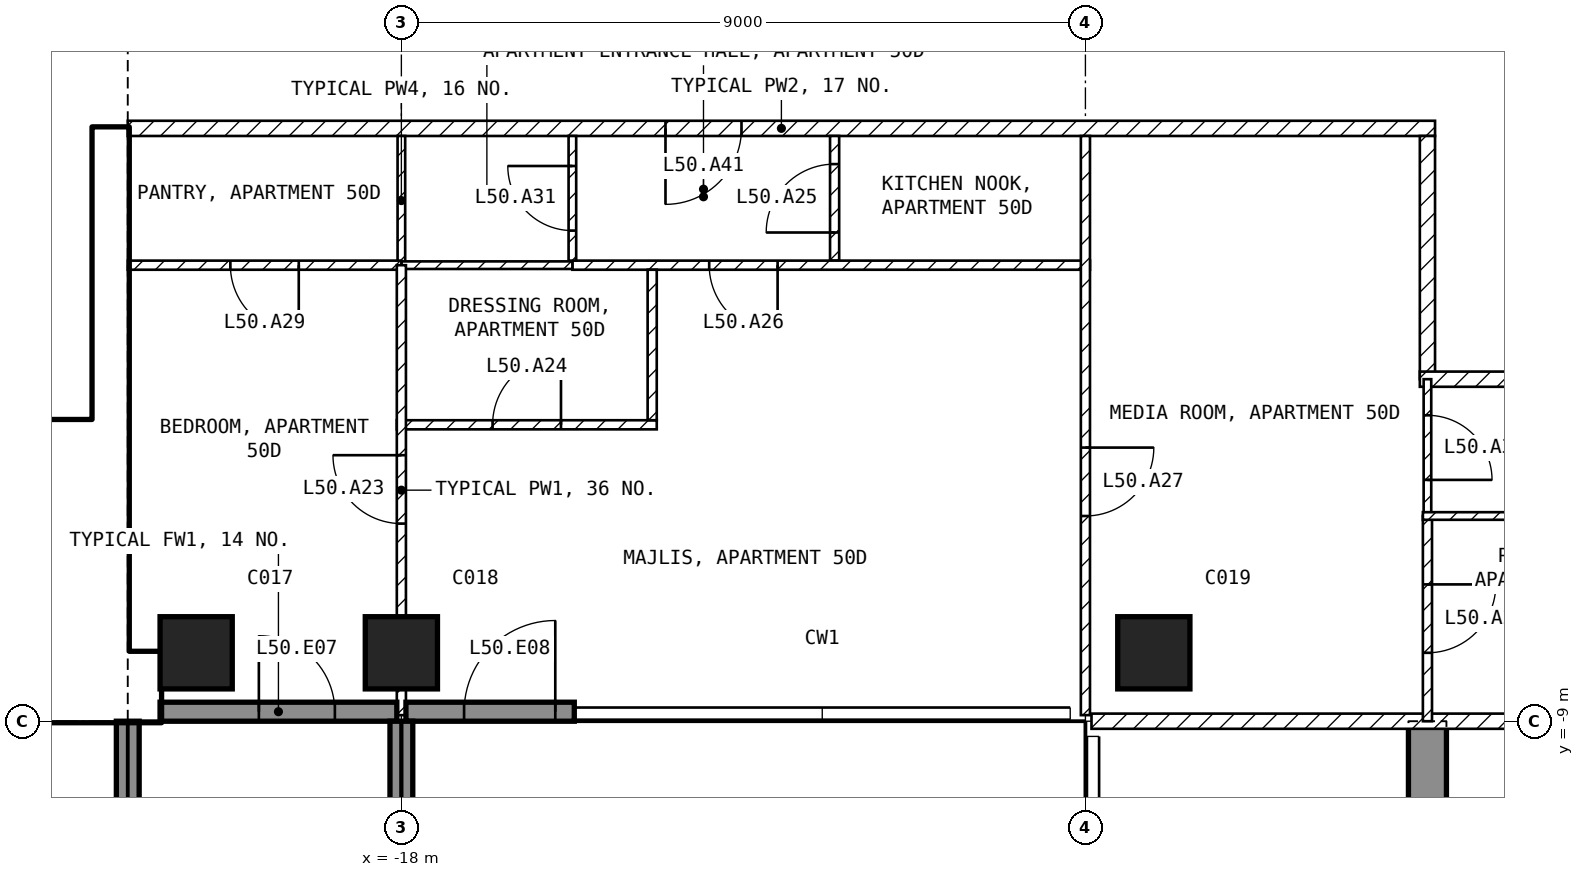
"""IFC4 building model, lengths in metres.
Left out: names, types, materials, properties, quantities, classifications, styles, units other than length and angle.
Written with IfcOpenShell. Run it as: python <this file> out.ifc"""

import sys

from ifc_helpers import new_model, si_unit, direction, frame, frame_2d, origin, origin_2d, place, context, subcontext, project, spatial, polyline, rectangle, outline, extrude, element, fill, save


model = new_model("IFC4")
c1 = context("Model", 3, precision=1e-05, world=origin(), true_north=direction((0.0, 1.0)))
c2 = subcontext(c1, "Body", "Model", "MODEL_VIEW")
j1 = project(units=[si_unit("LENGTHUNIT", "METRE"), si_unit("PLANEANGLEUNIT", "RADIAN")], contexts=[c1])
p1 = place(None, origin())
s1 = spatial("IfcSite", under=j1, at=p1, CompositionType="ELEMENT")
p2 = place(p1, origin())
s2 = spatial("IfcBuilding", under=s1, at=p2, CompositionType="ELEMENT")
p3 = place(p2, frame((0.0, 0.0, 201.6)))
s3 = spatial("IfcBuildingStorey", under=s2, at=p3, CompositionType="ELEMENT", Elevation=201.6)
for number, where, z_axis, x_axis in (
    (1, (-20.7, -8.1, -0.25), (0.0, 0.0, 1.0), (1.0, 0.0, 0.0)),
    (2, (-18.0, -8.1, -0.25), (0.0, 0.0, 1.0), (1.0, 0.0, 0.0)),
    (3, (-8.1, -8.1, -0.25), (0.0, 0.0, 1.0), (1.0, 0.0, 0.0)),
):
    element("IfcColumn", number, at=place(p3, frame(where, z_axis=z_axis, x_axis=x_axis)), inside=s3, PredefinedType="COLUMN", context=c2, shape_type="SweptSolid", body=[
        extrude(rectangle(XDim=0.95, YDim=0.95, at=origin_2d()), origin(), (0.0, 0.0, 1.0), 3.5),
    ])
p4 = place(p3, frame((-4.75, -20.225, -0.25), z_axis=(1.0, 0.0, 0.0), x_axis=(0.0, 1.0, 0.0)))
e4 = element("IfcWall", 4, at=p4, inside=s3, PredefinedType="SHEAR", context=c2, shape_type="SweptSolid", body=[
    extrude(outline(polyline([(0.0, 0.0), (6.725, 0.0), (6.725, 2.65), (9.125, 2.65), (9.125, 0.0), (11.225, 0.0), (11.225, 3.5), (0.0, 3.5), (0.0, 0.0)])), origin(), (0.0, 0.0, 1.0), 0.5),
])
p5 = place(p3, frame((-21.175, -8.875, 0.0), z_axis=(0.0, 0.0, 1.0), x_axis=(1.0, 0.0, 0.0)))
e5 = element("IfcWall", 5, at=p5, inside=s3, PredefinedType="SOLIDWALL", context=c2, shape_type="SweptSolid", body=[
    extrude(rectangle(XDim=3.115, YDim=0.25, at=frame_2d((1.558, 0.0))), origin(), (0.0, 0.0, 1.0), 3.25),
])
p6 = place(p5, frame((1.3, 0.0, 0.0)))
e6 = element("IfcOpeningElement", 6, at=p6, cuts=e5, PredefinedType="OPENING", context=c2, shape_type="SweptSolid", body=[
    extrude(rectangle(XDim=1.0, YDim=2.4, at=frame_2d((0.5, 1.2))), frame((0.0, 0.135, 0.0), z_axis=(0.0, -1.0, 0.0), x_axis=(1.0, 0.0, 0.0)), (0.0, 0.0, 1.0), 0.27),
])
p7 = place(p3, frame((-17.94, -8.875, 0.0), z_axis=(0.0, 0.0, 1.0), x_axis=(1.0, 0.0, 0.0)))
e7 = element("IfcWall", 7, at=p7, inside=s3, PredefinedType="SOLIDWALL", context=c2, shape_type="SweptSolid", body=[
    extrude(rectangle(XDim=2.215, YDim=0.25, at=frame_2d((1.107, 0.0))), origin(), (0.0, 0.0, 1.0), 3.25),
])
p8 = place(p7, frame((0.765, 0.0, 0.0)))
e8 = element("IfcOpeningElement", 8, at=p8, cuts=e7, PredefinedType="OPENING", context=c2, shape_type="SweptSolid", body=[
    extrude(rectangle(XDim=1.2, YDim=2.4, at=frame_2d((0.6, 1.2))), frame((0.0, 0.135, 0.0), z_axis=(0.0, -1.0, 0.0), x_axis=(1.0, 0.0, 0.0)), (0.0, 0.0, 1.0), 0.27),
])
for number, where, z_axis, x_axis in (
    (9, (-21.6, -9.0, 0.0), (0.0, 0.0, 1.0), (0.0, -1.0, 0.0)),
    (10, (-18.0, -9.0, 0.0), (0.0, 0.0, 1.0), (0.0, -1.0, 0.0)),
):
    element("IfcWall", number, at=place(p3, frame(where, z_axis=z_axis, x_axis=x_axis)), inside=s3, PredefinedType="SOLIDWALL", context=c2, shape_type="SweptSolid", body=[
        extrude(rectangle(XDim=2.7, YDim=0.3, at=frame_2d((1.35, 0.0))), origin(), (0.0, 0.0, 1.0), 3.25),
    ])
p9 = place(p3, frame((-30.2, -8.55, 0.0), z_axis=(0.0, 0.0, 1.0), x_axis=(1.0, 0.0, 0.0)))
e11 = element("IfcWall", 11, at=p9, inside=s3, PredefinedType="SHEAR", context=c2, shape_type="SweptSolid", body=[
    extrude(rectangle(XDim=9.025, YDim=0.9, at=frame_2d((4.512, 0.0))), origin(), (0.0, 0.0, 1.0), 3.25),
])
p10 = place(p3, frame((-21.825, -8.1, 0.0), z_axis=(0.0, 0.0, 1.0), x_axis=(0.0, 1.0, 0.0)))
e12 = element("IfcWall", 12, at=p10, inside=s3, PredefinedType="SHEAR", context=c2, shape_type="SweptSolid", body=[
    extrude(rectangle(XDim=6.9, YDim=0.45, at=frame_2d((3.45, 0.0))), origin(), (0.0, 0.0, 1.0), 3.25),
])
p11 = place(p3, frame((-28.35, -5.15, 0.0), z_axis=(0.0, 0.0, 1.0), x_axis=(1.0, 0.0, 0.0)))
e13 = element("IfcWall", 13, at=p11, inside=s3, PredefinedType="SOLIDWALL", context=c2, shape_type="SweptSolid", body=[
    extrude(rectangle(XDim=6.3, YDim=0.2, at=frame_2d((3.15, 0.0))), origin(), (0.0, 0.0, 1.0), 3.25),
])
p12 = place(p11, frame((5.1, 0.0, 0.0)))
e14 = element("IfcOpeningElement", 14, at=p12, cuts=e13, PredefinedType="OPENING", context=c2, shape_type="SweptSolid", body=[
    extrude(rectangle(XDim=1.0, YDim=2.1, at=frame_2d((0.5, 1.05))), frame((0.0, 0.11, 0.0), z_axis=(0.0, -1.0, 0.0), x_axis=(1.0, 0.0, 0.0)), (0.0, 0.0, 1.0), 0.22),
])
p13 = place(p3, frame((-4.4, -1.2, 0.0), z_axis=(0.0, 0.0, 1.0), x_axis=(-1.0, 0.0, 0.0)))
e15 = element("IfcWall", 15, at=p13, inside=s3, PredefinedType="PARTITIONING", context=c2, shape_type="SweptSolid", body=[
    extrude(rectangle(XDim=17.2, YDim=0.2, at=frame_2d((8.6, 0.0))), origin(), (0.0, 0.0, 1.0), 3.25),
])
p14 = place(p13, frame((9.125, 0.0, 0.0)))
e16 = element("IfcOpeningElement", 16, at=p14, cuts=e15, PredefinedType="OPENING", context=c2, shape_type="SweptSolid", body=[
    extrude(rectangle(XDim=1.0, YDim=2.1, at=frame_2d((0.5, 1.05))), frame((0.0, 0.11, 0.0), z_axis=(0.0, -1.0, 0.0), x_axis=(1.0, 0.0, 0.0)), (0.0, 0.0, 1.0), 0.22),
])
p15 = place(p3, frame((-4.5, -4.5, 0.0), z_axis=(0.0, 0.0, 1.0), x_axis=(0.0, 1.0, 0.0)))
e17 = element("IfcWall", 17, at=p15, inside=s3, PredefinedType="PARTITIONING", context=c2, shape_type="SweptSolid", body=[
    extrude(rectangle(XDim=3.2, YDim=0.2, at=frame_2d((1.6, 0.0))), origin(), (0.0, 0.0, 1.0), 3.25),
])
p16 = place(p3, frame((-1.1, -4.5, 0.0), z_axis=(0.0, 0.0, 1.0), x_axis=(-1.0, 0.0, 0.0)))
e18 = element("IfcWall", 18, at=p16, inside=s3, PredefinedType="PARTITIONING", context=c2, shape_type="SweptSolid", body=[
    extrude(rectangle(XDim=3.5, YDim=0.2, at=frame_2d((1.75, 0.0))), origin(), (0.0, 0.0, 1.0), 3.25),
])
p17 = place(p3, frame((8.92, -9.0, 0.0), z_axis=(0.0, 0.0, 1.0), x_axis=(-1.0, 0.0, 0.0)))
e19 = element("IfcWall", 19, at=p17, inside=s3, PredefinedType="PARTITIONING", context=c2, shape_type="SweptSolid", body=[
    extrude(rectangle(XDim=17.84, YDim=0.2, at=frame_2d((8.92, 0.0))), origin(), (0.0, 0.0, 1.0), 3.25),
])
p18 = place(p17, frame((8.42, 0.0, 0.0)))
e20 = element("IfcOpeningElement", 20, at=p18, cuts=e19, PredefinedType="OPENING", context=c2, shape_type="SweptSolid", body=[
    extrude(rectangle(XDim=1.0, YDim=2.1, at=frame_2d((0.5, 1.05))), frame((0.0, 0.11, 0.0), z_axis=(0.0, -1.0, 0.0), x_axis=(1.0, 0.0, 0.0)), (0.0, 0.0, 1.0), 0.22),
])
p19 = place(p3, frame((-12.3, -2.94, 0.0), z_axis=(0.0, 0.0, 1.0), x_axis=(0.0, 1.0, 0.0)))
e21 = element("IfcWall", 21, at=p19, inside=s3, PredefinedType="PARTITIONING", context=c2, shape_type="SweptSolid", body=[
    extrude(rectangle(XDim=1.64, YDim=0.12, at=frame_2d((0.82, 0.0))), origin(), (0.0, 0.0, 1.0), 3.25),
])
p20 = place(p19, frame((0.37, 0.0, 0.0)))
e22 = element("IfcOpeningElement", 22, at=p20, cuts=e21, PredefinedType="OPENING", context=c2, shape_type="SweptSolid", body=[
    extrude(rectangle(XDim=0.9, YDim=2.1, at=frame_2d((0.45, 1.05))), frame((0.0, 0.07, 0.0), z_axis=(0.0, -1.0, 0.0), x_axis=(1.0, 0.0, 0.0)), (0.0, 0.0, 1.0), 0.14),
])
p21 = place(p3, frame((-8.94, -3.0, 0.0), z_axis=(0.0, 0.0, 1.0), x_axis=(-1.0, 0.0, 0.0)))
e23 = element("IfcWall", 23, at=p21, inside=s3, PredefinedType="PARTITIONING", context=c2, shape_type="SweptSolid", body=[
    extrude(rectangle(XDim=6.81, YDim=0.12, at=frame_2d((3.405, 0.0))), origin(), (0.0, 0.0, 1.0), 3.25),
])
p22 = place(p21, frame((4.11, 0.0, 0.0)))
e24 = element("IfcOpeningElement", 24, at=p22, cuts=e23, PredefinedType="OPENING", context=c2, shape_type="SweptSolid", body=[
    extrude(rectangle(XDim=0.9, YDim=2.1, at=frame_2d((0.45, 1.05))), frame((0.0, 0.07, 0.0), z_axis=(0.0, -1.0, 0.0), x_axis=(1.0, 0.0, 0.0)), (0.0, 0.0, 1.0), 0.14),
])
p23 = place(p3, frame((-9.0, -1.3, 0.0), z_axis=(0.0, 0.0, 1.0), x_axis=(0.0, -1.0, 0.0)))
e25 = element("IfcWall", 25, at=p23, inside=s3, PredefinedType="PARTITIONING", context=c2, shape_type="SweptSolid", body=[
    extrude(rectangle(XDim=7.62, YDim=0.12, at=frame_2d((3.81, 0.0))), origin(), (0.0, 0.0, 1.0), 3.25),
])
p24 = place(p23, frame((4.1, 0.0, 0.0)))
e26 = element("IfcOpeningElement", 26, at=p24, cuts=e25, PredefinedType="OPENING", context=c2, shape_type="SweptSolid", body=[
    extrude(rectangle(XDim=0.9, YDim=2.1, at=frame_2d((0.45, 1.05))), frame((0.0, 0.07, 0.0), z_axis=(0.0, -1.0, 0.0), x_axis=(1.0, 0.0, 0.0)), (0.0, 0.0, 1.0), 0.14),
])
p25 = place(p3, frame((-15.75, -2.94, 0.0), z_axis=(0.0, 0.0, 1.0), x_axis=(0.0, 1.0, 0.0)))
e27 = element("IfcWall", 27, at=p25, inside=s3, PredefinedType="PARTITIONING", context=c2, shape_type="SweptSolid", body=[
    extrude(rectangle(XDim=1.64, YDim=0.1, at=frame_2d((0.82, 0.0))), origin(), (0.0, 0.0, 1.0), 3.25),
])
p26 = place(p25, frame((0.395, 0.0, 0.0)))
e28 = element("IfcOpeningElement", 28, at=p26, cuts=e27, PredefinedType="OPENING", context=c2, shape_type="SweptSolid", body=[
    extrude(rectangle(XDim=0.85, YDim=2.1, at=frame_2d((0.425, 1.05))), frame((0.0, 0.06, 0.0), z_axis=(0.0, -1.0, 0.0), x_axis=(1.0, 0.0, 0.0)), (0.0, 0.0, 1.0), 0.12),
])
p27 = place(p3, frame((-18.0, -3.0, 0.0), z_axis=(0.0, 0.0, 1.0), x_axis=(0.0, 1.0, 0.0)))
e29 = element("IfcWall", 29, at=p27, inside=s3, PredefinedType="PARTITIONING", context=c2, shape_type="SweptSolid", body=[
    extrude(rectangle(XDim=1.7, YDim=0.1, at=frame_2d((0.85, 0.0))), origin(), (0.0, 0.0, 1.0), 2.48),
])
p28 = place(p3, frame((-15.75, -3.0, 0.0), z_axis=(0.0, 0.0, 1.0), x_axis=(-1.0, 0.0, 0.0)))
e30 = element("IfcWall", 30, at=p28, inside=s3, PredefinedType="PARTITIONING", context=c2, shape_type="SweptSolid", body=[
    extrude(rectangle(XDim=2.25, YDim=0.1, at=frame_2d((1.125, 0.0))), origin(), (0.0, 0.0, 1.0), 3.25),
])
p29 = place(p3, frame((-18.0, -3.0, 0.0), z_axis=(0.0, 0.0, 1.0), x_axis=(-1.0, 0.0, 0.0)))
e31 = element("IfcWall", 31, at=p29, inside=s3, PredefinedType="PARTITIONING", context=c2, shape_type="SweptSolid", body=[
    extrude(rectangle(XDim=3.6, YDim=0.12, at=frame_2d((1.8, 0.0))), origin(), (0.0, 0.0, 1.0), 3.25),
])
p30 = place(p29, frame((1.35, 0.0, 0.0)))
e32 = element("IfcOpeningElement", 32, at=p30, cuts=e31, PredefinedType="OPENING", context=c2, shape_type="SweptSolid", body=[
    extrude(rectangle(XDim=0.9, YDim=2.1, at=frame_2d((0.45, 1.05))), frame((0.0, 0.07, 0.0), z_axis=(0.0, -1.0, 0.0), x_axis=(1.0, 0.0, 0.0)), (0.0, 0.0, 1.0), 0.14),
])
p31 = place(p3, frame((-18.06, -5.1, 0.0), z_axis=(0.0, 0.0, 1.0), x_axis=(1.0, 0.0, 0.0)))
e33 = element("IfcWall", 33, at=p31, inside=s3, PredefinedType="PARTITIONING", context=c2, shape_type="SweptSolid", body=[
    extrude(rectangle(XDim=3.42, YDim=0.12, at=frame_2d((1.71, 0.0))), origin(), (0.0, 0.0, 1.0), 3.25),
])
p32 = place(p31, frame((1.26, 0.0, 0.0)))
e34 = element("IfcOpeningElement", 34, at=p32, cuts=e33, PredefinedType="OPENING", context=c2, shape_type="SweptSolid", body=[
    extrude(rectangle(XDim=0.9, YDim=2.1, at=frame_2d((0.45, 1.05))), frame((0.0, 0.07, 0.0), z_axis=(0.0, -1.0, 0.0), x_axis=(1.0, 0.0, 0.0)), (0.0, 0.0, 1.0), 0.14),
])
p33 = place(p3, frame((-14.7, -5.04, 0.0), z_axis=(0.0, 0.0, 1.0), x_axis=(0.0, 1.0, 0.0)))
e35 = element("IfcWall", 35, at=p33, inside=s3, PredefinedType="PARTITIONING", context=c2, shape_type="SweptSolid", body=[
    extrude(rectangle(XDim=1.98, YDim=0.12, at=frame_2d((0.99, 0.0))), origin(), (0.0, 0.0, 1.0), 3.25),
])
p34 = place(p3, frame((-18.0, -8.92, 0.0), z_axis=(0.0, 0.0, 1.0), x_axis=(0.0, 1.0, 0.0)))
e36 = element("IfcWall", 36, at=p34, inside=s3, PredefinedType="PARTITIONING", context=c2, shape_type="SweptSolid", body=[
    extrude(rectangle(XDim=5.92, YDim=0.12, at=frame_2d((2.96, 0.0))), origin(), (0.0, 0.0, 1.0), 2.48),
])
p35 = place(p34, frame((2.52, 0.0, 0.0)))
e37 = element("IfcOpeningElement", 37, at=p35, cuts=e36, PredefinedType="OPENING", context=c2, shape_type="SweptSolid", body=[
    extrude(rectangle(XDim=0.9, YDim=2.1, at=frame_2d((0.45, 1.05))), frame((0.0, 0.07, 0.0), z_axis=(0.0, -1.0, 0.0), x_axis=(1.0, 0.0, 0.0)), (0.0, 0.0, 1.0), 0.14),
])
p36 = place(p3, frame((-4.5, -4.5, 0.0), z_axis=(0.0, 0.0, 1.0), x_axis=(0.0, -1.0, 0.0)))
e38 = element("IfcWall", 38, at=p36, inside=s3, PredefinedType="PARTITIONING", context=c2, shape_type="SweptSolid", body=[
    extrude(rectangle(XDim=1.8, YDim=0.1, at=frame_2d((0.9, 0.0))), origin(), (0.0, 0.0, 1.0), 3.25),
])
p37 = place(p36, frame((0.475, 0.0, 0.0)))
e39 = element("IfcOpeningElement", 39, at=p37, cuts=e38, PredefinedType="OPENING", context=c2, shape_type="SweptSolid", body=[
    extrude(rectangle(XDim=0.85, YDim=2.1, at=frame_2d((0.425, 1.05))), frame((0.0, 0.06, 0.0), z_axis=(0.0, -1.0, 0.0), x_axis=(1.0, 0.0, 0.0)), (0.0, 0.0, 1.0), 0.12),
])
p38 = place(p3, frame((-4.5, -6.3, 0.0), z_axis=(0.0, 0.0, 1.0), x_axis=(0.0, -1.0, 0.0)))
e40 = element("IfcWall", 40, at=p38, inside=s3, PredefinedType="PARTITIONING", context=c2, shape_type="SweptSolid", body=[
    extrude(rectangle(XDim=2.7, YDim=0.12, at=frame_2d((1.35, 0.0))), origin(), (0.0, 0.0, 1.0), 3.25),
])
p39 = place(p38, frame((0.9, 0.0, 0.0)))
e41 = element("IfcOpeningElement", 41, at=p39, cuts=e40, PredefinedType="OPENING", context=c2, shape_type="SweptSolid", body=[
    extrude(rectangle(XDim=0.9, YDim=2.1, at=frame_2d((0.45, 1.05))), frame((0.0, 0.07, 0.0), z_axis=(0.0, -1.0, 0.0), x_axis=(1.0, 0.0, 0.0)), (0.0, 0.0, 1.0), 0.14),
])
p40 = place(p3, frame((-1.1, -6.3, 0.0), z_axis=(0.0, 0.0, 1.0), x_axis=(-1.0, 0.0, 0.0)))
e42 = element("IfcWall", 42, at=p40, inside=s3, PredefinedType="PARTITIONING", context=c2, shape_type="SweptSolid", body=[
    extrude(rectangle(XDim=3.46, YDim=0.1, at=frame_2d((1.73, 0.0))), origin(), (0.0, 0.0, 1.0), 3.25),
])
p41 = place(p6, origin())
e43 = element("IfcDoor", 43, at=p41, inside=s3, OperationType="SINGLE_SWING_LEFT", PredefinedType="DOOR", context=c2, shape_type="SweptSolid", body=[
    extrude(rectangle(XDim=1.0, YDim=2.4, at=frame_2d((0.5, 1.2))), frame((0.0, 0.025, 0.0), z_axis=(0.0, -1.0, 0.0), x_axis=(1.0, 0.0, 0.0)), (0.0, 0.0, 1.0), 0.05),
])
fill(e6, e43)
p42 = place(p8, origin())
e44 = element("IfcDoor", 44, at=p42, inside=s3, OperationType="SINGLE_SWING_RIGHT", PredefinedType="DOOR", context=c2, shape_type="SweptSolid", body=[
    extrude(rectangle(XDim=1.2, YDim=2.4, at=frame_2d((0.6, 1.2))), frame((0.0, 0.025, 0.0), z_axis=(0.0, -1.0, 0.0), x_axis=(1.0, 0.0, 0.0)), (0.0, 0.0, 1.0), 0.05),
])
fill(e8, e44)
p43 = place(p12, origin())
e45 = element("IfcDoor", 45, at=p43, inside=s3, OperationType="SINGLE_SWING_LEFT", PredefinedType="DOOR", context=c2, shape_type="SweptSolid", body=[
    extrude(rectangle(XDim=1.0, YDim=2.1, at=frame_2d((0.5, 1.05))), frame((0.0, 0.025, 0.0), z_axis=(0.0, -1.0, 0.0), x_axis=(1.0, 0.0, 0.0)), (0.0, 0.0, 1.0), 0.05),
])
fill(e14, e45)
p44 = place(p35, origin())
e46 = element("IfcDoor", 46, at=p44, inside=s3, OperationType="SINGLE_SWING_RIGHT", PredefinedType="DOOR", context=c2, shape_type="SweptSolid", body=[
    extrude(rectangle(XDim=0.9, YDim=2.1, at=frame_2d((0.45, 1.05))), frame((0.0, 0.025, 0.0), z_axis=(0.0, -1.0, 0.0), x_axis=(1.0, 0.0, 0.0)), (0.0, 0.0, 1.0), 0.05),
])
fill(e37, e46)
p45 = place(p32, origin())
e47 = element("IfcDoor", 47, at=p45, inside=s3, OperationType="SINGLE_SWING_RIGHT", PredefinedType="DOOR", context=c2, shape_type="SweptSolid", body=[
    extrude(rectangle(XDim=0.9, YDim=2.1, at=frame_2d((0.45, 1.05))), frame((0.0, 0.025, 0.0), z_axis=(0.0, -1.0, 0.0), x_axis=(1.0, 0.0, 0.0)), (0.0, 0.0, 1.0), 0.05),
])
fill(e34, e47)
p46 = place(p20, origin())
e48 = element("IfcDoor", 48, at=p46, inside=s3, OperationType="SINGLE_SWING_LEFT", PredefinedType="DOOR", context=c2, shape_type="SweptSolid", body=[
    extrude(rectangle(XDim=0.9, YDim=2.1, at=frame_2d((0.45, 1.05))), frame((0.0, 0.025, 0.0), z_axis=(0.0, -1.0, 0.0), x_axis=(1.0, 0.0, 0.0)), (0.0, 0.0, 1.0), 0.05),
])
fill(e22, e48)
p47 = place(p22, origin())
e49 = element("IfcDoor", 49, at=p47, inside=s3, OperationType="SINGLE_SWING_LEFT", PredefinedType="DOOR", context=c2, shape_type="SweptSolid", body=[
    extrude(rectangle(XDim=0.9, YDim=2.1, at=frame_2d((0.45, 1.05))), frame((0.0, 0.025, 0.0), z_axis=(0.0, -1.0, 0.0), x_axis=(1.0, 0.0, 0.0)), (0.0, 0.0, 1.0), 0.05),
])
fill(e24, e49)
p48 = place(p24, origin())
e50 = element("IfcDoor", 50, at=p48, inside=s3, OperationType="SINGLE_SWING_LEFT", PredefinedType="DOOR", context=c2, shape_type="SweptSolid", body=[
    extrude(rectangle(XDim=0.9, YDim=2.1, at=frame_2d((0.45, 1.05))), frame((0.0, 0.025, 0.0), z_axis=(0.0, -1.0, 0.0), x_axis=(1.0, 0.0, 0.0)), (0.0, 0.0, 1.0), 0.05),
])
fill(e26, e50)
p49 = place(p39, origin())
e51 = element("IfcDoor", 51, at=p49, inside=s3, OperationType="SINGLE_SWING_LEFT", PredefinedType="DOOR", context=c2, shape_type="SweptSolid", body=[
    extrude(rectangle(XDim=0.9, YDim=2.1, at=frame_2d((0.45, 1.05))), frame((0.0, 0.025, 0.0), z_axis=(0.0, -1.0, 0.0), x_axis=(1.0, 0.0, 0.0)), (0.0, 0.0, 1.0), 0.05),
])
fill(e41, e51)
p50 = place(p30, origin())
e52 = element("IfcDoor", 52, at=p50, inside=s3, OperationType="SINGLE_SWING_LEFT", PredefinedType="DOOR", context=c2, shape_type="SweptSolid", body=[
    extrude(rectangle(XDim=0.9, YDim=2.1, at=frame_2d((0.45, 1.05))), frame((0.0, 0.025, 0.0), z_axis=(0.0, -1.0, 0.0), x_axis=(1.0, 0.0, 0.0)), (0.0, 0.0, 1.0), 0.05),
])
fill(e32, e52)
p51 = place(p37, origin())
e53 = element("IfcDoor", 53, at=p51, inside=s3, OperationType="SINGLE_SWING_RIGHT", PredefinedType="DOOR", context=c2, shape_type="SweptSolid", body=[
    extrude(rectangle(XDim=0.85, YDim=2.1, at=frame_2d((0.425, 1.05))), frame((0.0, 0.025, 0.0), z_axis=(0.0, -1.0, 0.0), x_axis=(1.0, 0.0, 0.0)), (0.0, 0.0, 1.0), 0.05),
])
fill(e39, e53)
p52 = place(p26, origin())
e54 = element("IfcDoor", 54, at=p52, inside=s3, OperationType="SINGLE_SWING_RIGHT", PredefinedType="DOOR", context=c2, shape_type="SweptSolid", body=[
    extrude(rectangle(XDim=0.85, YDim=2.1, at=frame_2d((0.425, 1.05))), frame((0.0, 0.025, 0.0), z_axis=(0.0, -1.0, 0.0), x_axis=(1.0, 0.0, 0.0)), (0.0, 0.0, 1.0), 0.05),
])
fill(e28, e54)
p53 = place(p14, origin())
e55 = element("IfcDoor", 55, at=p53, inside=s3, OperationType="SINGLE_SWING_RIGHT", PredefinedType="DOOR", context=c2, shape_type="SweptSolid", body=[
    extrude(rectangle(XDim=1.0, YDim=2.1, at=frame_2d((0.5, 1.05))), frame((0.0, 0.025, 0.0), z_axis=(0.0, -1.0, 0.0), x_axis=(1.0, 0.0, 0.0)), (0.0, 0.0, 1.0), 0.05),
])
fill(e16, e55)
save(model, sys.argv[1])
